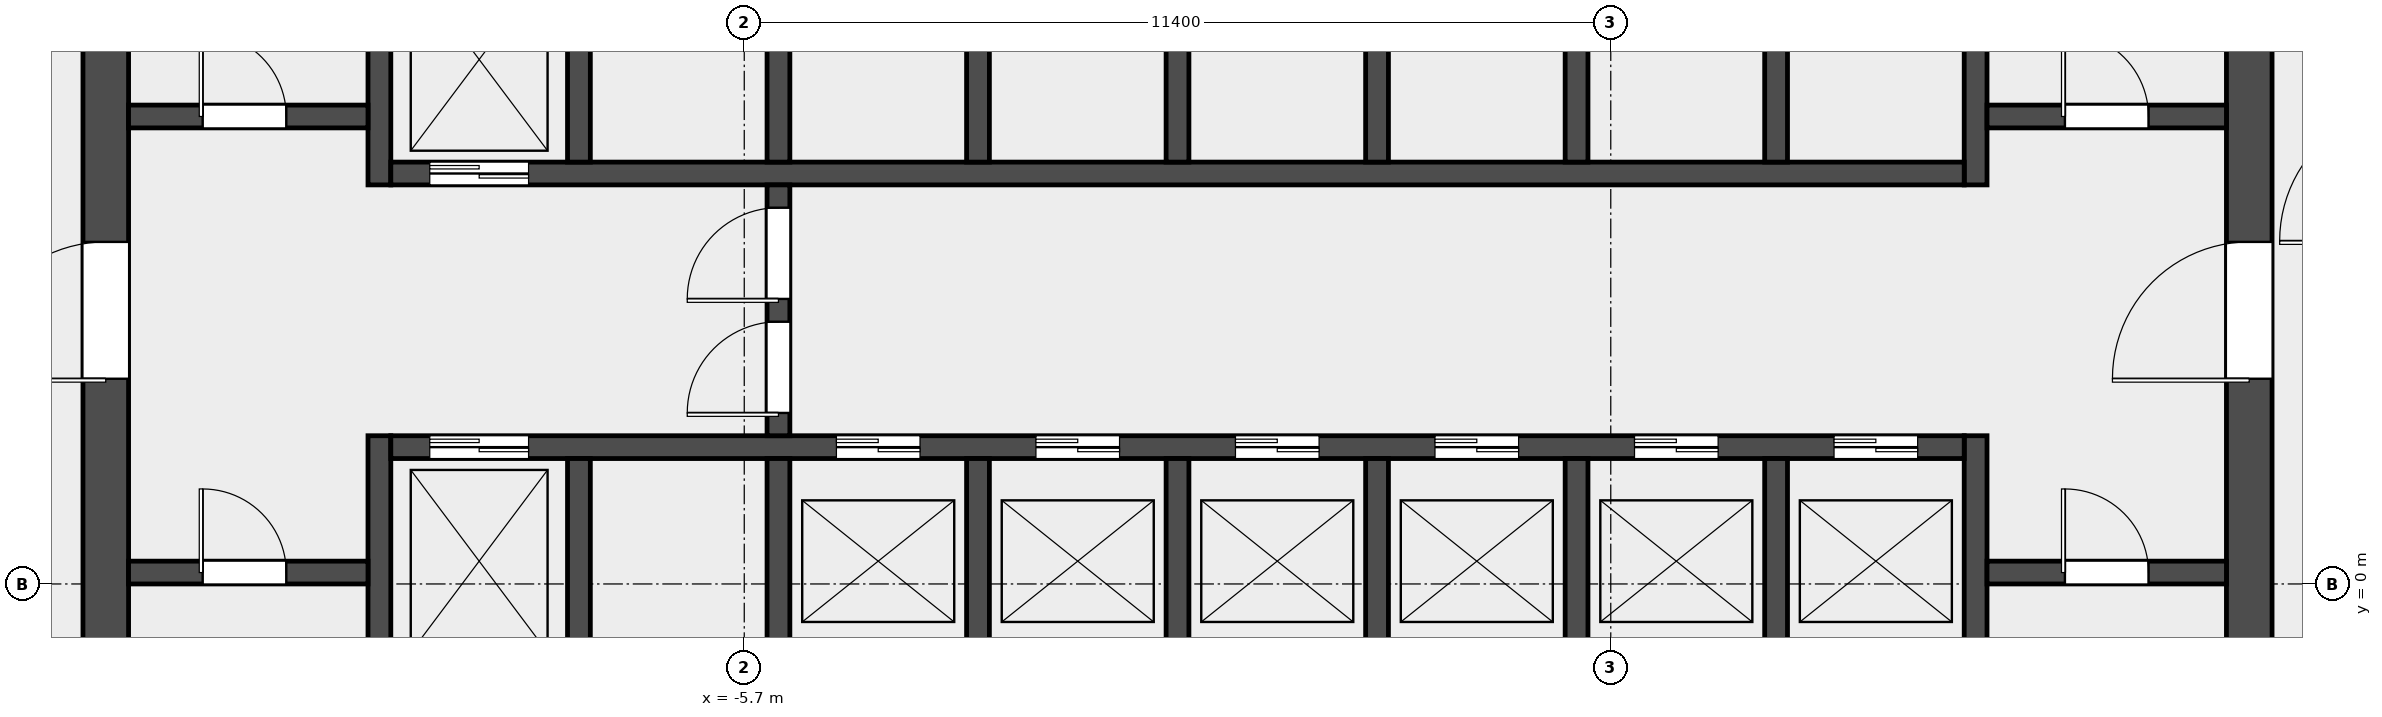
"""IFC4 building model, lengths in metres.
Left out: names, types, materials, properties, quantities, classifications, styles, units other than length and angle.
Written with IfcOpenShell. Run it as: python <this file> out.ifc"""

import sys

from ifc_helpers import new_model, si_unit, direction, frame, frame_2d, origin, place, context, subcontext, project, spatial, rectangle, extrude, element, fill, save


model = new_model("IFC4")
c1 = context("Model", 3, precision=1e-05, world=origin(), true_north=direction((0.0, 1.0)))
c2 = subcontext(c1, "Body", "Model", "MODEL_VIEW")
j1 = project(units=[si_unit("LENGTHUNIT", "METRE"), si_unit("PLANEANGLEUNIT", "RADIAN")], contexts=[c1])
p1 = place(None, origin())
s1 = spatial("IfcSite", under=j1, at=p1, CompositionType="ELEMENT")
p2 = place(p1, origin())
s2 = spatial("IfcBuilding", under=s1, at=p2, CompositionType="ELEMENT")
p3 = place(p2, frame((0.0, 0.0, 117.1)))
s3 = spatial("IfcBuildingStorey", under=s2, at=p3, CompositionType="ELEMENT", Elevation=117.1)
p4 = place(p3, frame((-14.1, -6.6, 0.0), z_axis=(0.0, 0.0, 1.0), x_axis=(0.0, 1.0, 0.0)))
e1 = element("IfcWall", 1, at=p4, inside=s3, PredefinedType="SHEAR", context=c2, shape_type="SweptSolid", body=[
    extrude(rectangle(XDim=19.5, YDim=0.6, at=frame_2d((9.75, 0.0))), origin(), (0.0, 0.0, 1.0), 4.2),
])
p5 = place(p4, frame((9.3, 0.0, 0.0)))
e2 = element("IfcOpeningElement", 2, at=p5, cuts=e1, PredefinedType="OPENING", context=c2, shape_type="SweptSolid", body=[
    extrude(rectangle(XDim=1.8, YDim=2.1, at=frame_2d((0.9, 1.05))), frame((0.0, 0.312, 0.0), z_axis=(0.0, -1.0, 0.0), x_axis=(1.0, 0.0, 0.0)), (0.0, 0.0, 1.0), 0.624),
])
p6 = place(p3, frame((14.1, -6.6, 0.0), z_axis=(0.0, 0.0, 1.0), x_axis=(0.0, 1.0, 0.0)))
e3 = element("IfcWall", 3, at=p6, inside=s3, PredefinedType="SHEAR", context=c2, shape_type="SweptSolid", body=[
    extrude(rectangle(XDim=19.5, YDim=0.6, at=frame_2d((9.75, 0.0))), origin(), (0.0, 0.0, 1.0), 4.2),
])
p7 = place(p6, frame((9.3, 0.0, 0.0)))
e4 = element("IfcOpeningElement", 4, at=p7, cuts=e3, PredefinedType="OPENING", context=c2, shape_type="SweptSolid", body=[
    extrude(rectangle(XDim=1.8, YDim=2.1, at=frame_2d((0.9, 1.05))), frame((0.0, 0.312, 0.0), z_axis=(0.0, -1.0, 0.0), x_axis=(1.0, 0.0, 0.0)), (0.0, 0.0, 1.0), 0.624),
])
p8 = place(p3, frame((-10.5, -6.6, 0.0), z_axis=(0.0, 0.0, 1.0), x_axis=(0.0, 1.0, 0.0)))
e5 = element("IfcWall", 5, at=p8, inside=s3, PredefinedType="SHEAR", context=c2, shape_type="SweptSolid", body=[
    extrude(rectangle(XDim=8.55, YDim=0.3, at=frame_2d((4.275, 0.0))), origin(), (0.0, 0.0, 1.0), 4.2),
])
p9 = place(p3, frame((-10.5, 5.25, 0.0), z_axis=(0.0, 0.0, 1.0), x_axis=(0.0, 1.0, 0.0)))
e6 = element("IfcWall", 6, at=p9, inside=s3, PredefinedType="SHEAR", context=c2, shape_type="SweptSolid", body=[
    extrude(rectangle(XDim=7.65, YDim=0.3, at=frame_2d((3.825, 0.0))), origin(), (0.0, 0.0, 1.0), 4.2),
])
p10 = place(p3, frame((10.5, -6.6, 0.0), z_axis=(0.0, 0.0, 1.0), x_axis=(0.0, 1.0, 0.0)))
e7 = element("IfcWall", 7, at=p10, inside=s3, PredefinedType="SHEAR", context=c2, shape_type="SweptSolid", body=[
    extrude(rectangle(XDim=8.55, YDim=0.3, at=frame_2d((4.275, 0.0))), origin(), (0.0, 0.0, 1.0), 4.2),
])
p11 = place(p3, frame((10.5, 5.25, 0.0), z_axis=(0.0, 0.0, 1.0), x_axis=(0.0, 1.0, 0.0)))
e8 = element("IfcWall", 8, at=p11, inside=s3, PredefinedType="SHEAR", context=c2, shape_type="SweptSolid", body=[
    extrude(rectangle(XDim=7.65, YDim=0.3, at=frame_2d((3.825, 0.0))), origin(), (0.0, 0.0, 1.0), 4.2),
])
p12 = place(p3, frame((-13.8, 0.15, 0.0), z_axis=(0.0, 0.0, 1.0), x_axis=(1.0, 0.0, 0.0)))
e9 = element("IfcWall", 9, at=p12, inside=s3, PredefinedType="SOLIDWALL", context=c2, shape_type="SweptSolid", body=[
    extrude(rectangle(XDim=3.15, YDim=0.3, at=frame_2d((1.575, 0.0))), origin(), (0.0, 0.0, 1.0), 4.2),
])
p13 = place(p12, frame((0.975, 0.0, 0.0)))
e10 = element("IfcOpeningElement", 10, at=p13, cuts=e9, PredefinedType="OPENING", context=c2, shape_type="SweptSolid", body=[
    extrude(rectangle(XDim=1.1, YDim=2.1, at=frame_2d((0.55, 1.05))), frame((0.0, 0.162, 0.0), z_axis=(0.0, -1.0, 0.0), x_axis=(1.0, 0.0, 0.0)), (0.0, 0.0, 1.0), 0.324),
])
p14 = place(p3, frame((-13.8, 6.15, 0.0), z_axis=(0.0, 0.0, 1.0), x_axis=(1.0, 0.0, 0.0)))
e11 = element("IfcWall", 11, at=p14, inside=s3, PredefinedType="SOLIDWALL", context=c2, shape_type="SweptSolid", body=[
    extrude(rectangle(XDim=3.15, YDim=0.3, at=frame_2d((1.575, 0.0))), origin(), (0.0, 0.0, 1.0), 4.2),
])
p15 = place(p14, frame((0.975, 0.0, 0.0)))
e12 = element("IfcOpeningElement", 12, at=p15, cuts=e11, PredefinedType="OPENING", context=c2, shape_type="SweptSolid", body=[
    extrude(rectangle(XDim=1.1, YDim=2.1, at=frame_2d((0.55, 1.05))), frame((0.0, 0.162, 0.0), z_axis=(0.0, -1.0, 0.0), x_axis=(1.0, 0.0, 0.0)), (0.0, 0.0, 1.0), 0.324),
])
p16 = place(p3, frame((10.65, 0.15, 0.0), z_axis=(0.0, 0.0, 1.0), x_axis=(1.0, 0.0, 0.0)))
e13 = element("IfcWall", 13, at=p16, inside=s3, PredefinedType="SOLIDWALL", context=c2, shape_type="SweptSolid", body=[
    extrude(rectangle(XDim=3.15, YDim=0.3, at=frame_2d((1.575, 0.0))), origin(), (0.0, 0.0, 1.0), 4.2),
])
p17 = place(p16, frame((1.025, 0.0, 0.0)))
e14 = element("IfcOpeningElement", 14, at=p17, cuts=e13, PredefinedType="OPENING", context=c2, shape_type="SweptSolid", body=[
    extrude(rectangle(XDim=1.1, YDim=2.1, at=frame_2d((0.55, 1.05))), frame((0.0, 0.162, 0.0), z_axis=(0.0, -1.0, 0.0), x_axis=(1.0, 0.0, 0.0)), (0.0, 0.0, 1.0), 0.324),
])
p18 = place(p3, frame((10.65, 6.15, 0.0), z_axis=(0.0, 0.0, 1.0), x_axis=(1.0, 0.0, 0.0)))
e15 = element("IfcWall", 15, at=p18, inside=s3, PredefinedType="SOLIDWALL", context=c2, shape_type="SweptSolid", body=[
    extrude(rectangle(XDim=3.15, YDim=0.3, at=frame_2d((1.575, 0.0))), origin(), (0.0, 0.0, 1.0), 4.2),
])
p19 = place(p18, frame((1.025, 0.0, 0.0)))
e16 = element("IfcOpeningElement", 16, at=p19, cuts=e15, PredefinedType="OPENING", context=c2, shape_type="SweptSolid", body=[
    extrude(rectangle(XDim=1.1, YDim=2.1, at=frame_2d((0.55, 1.05))), frame((0.0, 0.162, 0.0), z_axis=(0.0, -1.0, 0.0), x_axis=(1.0, 0.0, 0.0)), (0.0, 0.0, 1.0), 0.324),
])
p20 = place(p3, frame((-10.35, 1.8, 0.0), z_axis=(0.0, 0.0, 1.0), x_axis=(1.0, 0.0, 0.0)))
e17 = element("IfcWall", 17, at=p20, inside=s3, PredefinedType="SOLIDWALL", context=c2, shape_type="SweptSolid", body=[
    extrude(rectangle(XDim=20.7, YDim=0.3, at=frame_2d((10.35, 0.0))), origin(), (0.0, 0.0, 1.0), 4.2),
])
p21 = place(p20, frame((0.512, 0.0, 0.0)))
e18 = element("IfcOpeningElement", 18, at=p21, cuts=e17, PredefinedType="OPENING", context=c2, shape_type="SweptSolid", body=[
    extrude(rectangle(XDim=1.3, YDim=2.1, at=frame_2d((0.65, 1.05))), frame((0.0, 0.162, 0.0), z_axis=(0.0, -1.0, 0.0), x_axis=(1.0, 0.0, 0.0)), (0.0, 0.0, 1.0), 0.324),
])
p22 = place(p20, frame((5.863, 0.0, 0.0)))
e19 = element("IfcOpeningElement", 19, at=p22, cuts=e17, PredefinedType="OPENING", context=c2, shape_type="SweptSolid", body=[
    extrude(rectangle(XDim=1.1, YDim=2.1, at=frame_2d((0.55, 1.05))), frame((0.0, 0.162, 0.0), z_axis=(0.0, -1.0, 0.0), x_axis=(1.0, 0.0, 0.0)), (0.0, 0.0, 1.0), 0.324),
])
p23 = place(p20, frame((8.488, 0.0, 0.0)))
e20 = element("IfcOpeningElement", 20, at=p23, cuts=e17, PredefinedType="OPENING", context=c2, shape_type="SweptSolid", body=[
    extrude(rectangle(XDim=1.1, YDim=2.1, at=frame_2d((0.55, 1.05))), frame((0.0, 0.162, 0.0), z_axis=(0.0, -1.0, 0.0), x_axis=(1.0, 0.0, 0.0)), (0.0, 0.0, 1.0), 0.324),
])
p24 = place(p20, frame((11.113, 0.0, 0.0)))
e21 = element("IfcOpeningElement", 21, at=p24, cuts=e17, PredefinedType="OPENING", context=c2, shape_type="SweptSolid", body=[
    extrude(rectangle(XDim=1.1, YDim=2.1, at=frame_2d((0.55, 1.05))), frame((0.0, 0.162, 0.0), z_axis=(0.0, -1.0, 0.0), x_axis=(1.0, 0.0, 0.0)), (0.0, 0.0, 1.0), 0.324),
])
p25 = place(p20, frame((13.738, 0.0, 0.0)))
e22 = element("IfcOpeningElement", 22, at=p25, cuts=e17, PredefinedType="OPENING", context=c2, shape_type="SweptSolid", body=[
    extrude(rectangle(XDim=1.1, YDim=2.1, at=frame_2d((0.55, 1.05))), frame((0.0, 0.162, 0.0), z_axis=(0.0, -1.0, 0.0), x_axis=(1.0, 0.0, 0.0)), (0.0, 0.0, 1.0), 0.324),
])
p26 = place(p20, frame((16.363, 0.0, 0.0)))
e23 = element("IfcOpeningElement", 23, at=p26, cuts=e17, PredefinedType="OPENING", context=c2, shape_type="SweptSolid", body=[
    extrude(rectangle(XDim=1.1, YDim=2.1, at=frame_2d((0.55, 1.05))), frame((0.0, 0.162, 0.0), z_axis=(0.0, -1.0, 0.0), x_axis=(1.0, 0.0, 0.0)), (0.0, 0.0, 1.0), 0.324),
])
p27 = place(p20, frame((18.988, 0.0, 0.0)))
e24 = element("IfcOpeningElement", 24, at=p27, cuts=e17, PredefinedType="OPENING", context=c2, shape_type="SweptSolid", body=[
    extrude(rectangle(XDim=1.1, YDim=2.1, at=frame_2d((0.55, 1.05))), frame((0.0, 0.162, 0.0), z_axis=(0.0, -1.0, 0.0), x_axis=(1.0, 0.0, 0.0)), (0.0, 0.0, 1.0), 0.324),
])
p28 = place(p3, frame((-10.35, 5.4, 0.0), z_axis=(0.0, 0.0, 1.0), x_axis=(1.0, 0.0, 0.0)))
e25 = element("IfcWall", 25, at=p28, inside=s3, PredefinedType="SOLIDWALL", context=c2, shape_type="SweptSolid", body=[
    extrude(rectangle(XDim=20.7, YDim=0.3, at=frame_2d((10.35, 0.0))), origin(), (0.0, 0.0, 1.0), 4.2),
])
p29 = place(p28, frame((0.512, 0.0, 0.0)))
e26 = element("IfcOpeningElement", 26, at=p29, cuts=e25, PredefinedType="OPENING", context=c2, shape_type="SweptSolid", body=[
    extrude(rectangle(XDim=1.3, YDim=2.1, at=frame_2d((0.65, 1.05))), frame((0.0, 0.162, 0.0), z_axis=(0.0, -1.0, 0.0), x_axis=(1.0, 0.0, 0.0)), (0.0, 0.0, 1.0), 0.324),
])
for number, where, z_axis, x_axis in (
    (27, (-7.875, -1.05, 0.0), (0.0, 0.0, 1.0), (0.0, 1.0, 0.0)),
    (28, (-5.25, -1.05, 0.0), (0.0, 0.0, 1.0), (0.0, 1.0, 0.0)),
    (29, (-2.625, -1.05, 0.0), (0.0, 0.0, 1.0), (0.0, 1.0, 0.0)),
    (30, (0.0, -1.05, 0.0), (0.0, 0.0, 1.0), (0.0, 1.0, 0.0)),
    (31, (2.625, -1.05, 0.0), (0.0, 0.0, 1.0), (0.0, 1.0, 0.0)),
    (32, (5.25, -1.05, 0.0), (0.0, 0.0, 1.0), (0.0, 1.0, 0.0)),
    (33, (7.875, -1.05, 0.0), (0.0, 0.0, 1.0), (0.0, 1.0, 0.0)),
    (34, (-7.875, 5.55, 0.0), (0.0, 0.0, 1.0), (0.0, 1.0, 0.0)),
    (35, (-5.25, 5.55, 0.0), (0.0, 0.0, 1.0), (0.0, 1.0, 0.0)),
    (36, (-2.625, 5.55, 0.0), (0.0, 0.0, 1.0), (0.0, 1.0, 0.0)),
    (37, (0.0, 5.55, 0.0), (0.0, 0.0, 1.0), (0.0, 1.0, 0.0)),
    (38, (2.625, 5.55, 0.0), (0.0, 0.0, 1.0), (0.0, 1.0, 0.0)),
    (39, (5.25, 5.55, 0.0), (0.0, 0.0, 1.0), (0.0, 1.0, 0.0)),
    (40, (7.875, 5.55, 0.0), (0.0, 0.0, 1.0), (0.0, 1.0, 0.0)),
):
    element("IfcWall", number, at=place(p3, frame(where, z_axis=z_axis, x_axis=x_axis)), inside=s3, PredefinedType="SOLIDWALL", context=c2, shape_type="SweptSolid", body=[
        extrude(rectangle(XDim=2.7, YDim=0.3, at=frame_2d((1.35, 0.0))), origin(), (0.0, 0.0, 1.0), 4.2),
    ])
p30 = place(p3, frame((-5.25, 1.95, 0.0), z_axis=(0.0, 0.0, 1.0), x_axis=(0.0, 1.0, 0.0)))
e41 = element("IfcWall", 41, at=p30, inside=s3, PredefinedType="SOLIDWALL", context=c2, shape_type="SweptSolid", body=[
    extrude(rectangle(XDim=3.3, YDim=0.3, at=frame_2d((1.65, 0.0))), origin(), (0.0, 0.0, 1.0), 4.2),
])
p31 = place(p30, frame((0.3, 0.0, 0.0)))
e42 = element("IfcOpeningElement", 42, at=p31, cuts=e41, PredefinedType="OPENING", context=c2, shape_type="SweptSolid", body=[
    extrude(rectangle(XDim=1.2, YDim=2.1, at=frame_2d((0.6, 1.05))), frame((0.0, 0.162, 0.0), z_axis=(0.0, -1.0, 0.0), x_axis=(1.0, 0.0, 0.0)), (0.0, 0.0, 1.0), 0.324),
])
p32 = place(p30, frame((1.8, 0.0, 0.0)))
e43 = element("IfcOpeningElement", 43, at=p32, cuts=e41, PredefinedType="OPENING", context=c2, shape_type="SweptSolid", body=[
    extrude(rectangle(XDim=1.2, YDim=2.1, at=frame_2d((0.6, 1.05))), frame((0.0, 0.162, 0.0), z_axis=(0.0, -1.0, 0.0), x_axis=(1.0, 0.0, 0.0)), (0.0, 0.0, 1.0), 0.324),
])
p33 = place(p13, origin())
e44 = element("IfcDoor", 44, at=p33, inside=s3, OperationType="SINGLE_SWING_LEFT", PredefinedType="DOOR", context=c2, shape_type="SweptSolid", body=[
    extrude(rectangle(XDim=1.1, YDim=2.1, at=frame_2d((0.55, 1.05))), frame((0.0, 0.025, 0.0), z_axis=(0.0, -1.0, 0.0), x_axis=(1.0, 0.0, 0.0)), (0.0, 0.0, 1.0), 0.05),
])
fill(e10, e44)
p34 = place(p15, origin())
e45 = element("IfcDoor", 45, at=p34, inside=s3, OperationType="SINGLE_SWING_LEFT", PredefinedType="DOOR", context=c2, shape_type="SweptSolid", body=[
    extrude(rectangle(XDim=1.1, YDim=2.1, at=frame_2d((0.55, 1.05))), frame((0.0, 0.025, 0.0), z_axis=(0.0, -1.0, 0.0), x_axis=(1.0, 0.0, 0.0)), (0.0, 0.0, 1.0), 0.05),
])
fill(e12, e45)
p35 = place(p17, origin())
e46 = element("IfcDoor", 46, at=p35, inside=s3, OperationType="SINGLE_SWING_RIGHT", PredefinedType="DOOR", context=c2, shape_type="SweptSolid", body=[
    extrude(rectangle(XDim=1.1, YDim=2.1, at=frame_2d((0.55, 1.05))), frame((0.0, 0.025, 0.0), z_axis=(0.0, -1.0, 0.0), x_axis=(1.0, 0.0, 0.0)), (0.0, 0.0, 1.0), 0.05),
])
fill(e14, e46)
p36 = place(p19, origin())
e47 = element("IfcDoor", 47, at=p36, inside=s3, OperationType="SINGLE_SWING_RIGHT", PredefinedType="DOOR", context=c2, shape_type="SweptSolid", body=[
    extrude(rectangle(XDim=1.1, YDim=2.1, at=frame_2d((0.55, 1.05))), frame((0.0, 0.025, 0.0), z_axis=(0.0, -1.0, 0.0), x_axis=(1.0, 0.0, 0.0)), (0.0, 0.0, 1.0), 0.05),
])
fill(e16, e47)
p37 = place(p5, origin())
e48 = element("IfcDoor", 48, at=p37, inside=s3, OperationType="DOUBLE_DOOR_SINGLE_SWING", PredefinedType="DOOR", context=c2, shape_type="SweptSolid", body=[
    extrude(rectangle(XDim=1.8, YDim=2.1, at=frame_2d((0.9, 1.05))), frame((0.0, 0.025, 0.0), z_axis=(0.0, -1.0, 0.0), x_axis=(1.0, 0.0, 0.0)), (0.0, 0.0, 1.0), 0.05),
])
fill(e2, e48)
p38 = place(p7, origin())
e49 = element("IfcDoor", 49, at=p38, inside=s3, OperationType="DOUBLE_DOOR_SINGLE_SWING", PredefinedType="DOOR", context=c2, shape_type="SweptSolid", body=[
    extrude(rectangle(XDim=1.8, YDim=2.1, at=frame_2d((0.9, 1.05))), frame((0.0, 0.025, 0.0), z_axis=(0.0, -1.0, 0.0), x_axis=(1.0, 0.0, 0.0)), (0.0, 0.0, 1.0), 0.05),
])
fill(e4, e49)
p39 = place(p31, origin())
e50 = element("IfcDoor", 50, at=p39, inside=s3, OperationType="SINGLE_SWING_LEFT", PredefinedType="DOOR", context=c2, shape_type="SweptSolid", body=[
    extrude(rectangle(XDim=1.2, YDim=2.1, at=frame_2d((0.6, 1.05))), frame((0.0, 0.025, 0.0), z_axis=(0.0, -1.0, 0.0), x_axis=(1.0, 0.0, 0.0)), (0.0, 0.0, 1.0), 0.05),
])
fill(e42, e50)
p40 = place(p32, origin())
e51 = element("IfcDoor", 51, at=p40, inside=s3, OperationType="SINGLE_SWING_RIGHT", PredefinedType="DOOR", context=c2, shape_type="SweptSolid", body=[
    extrude(rectangle(XDim=1.2, YDim=2.1, at=frame_2d((0.6, 1.05))), frame((0.0, 0.025, 0.0), z_axis=(0.0, -1.0, 0.0), x_axis=(1.0, 0.0, 0.0)), (0.0, 0.0, 1.0), 0.05),
])
fill(e43, e51)
p41 = place(p21, origin())
e52 = element("IfcDoor", 52, at=p41, inside=s3, OperationType="DOUBLE_DOOR_SLIDING", PredefinedType="DOOR", context=c2, shape_type="SweptSolid", body=[
    extrude(rectangle(XDim=1.3, YDim=2.1, at=frame_2d((0.65, 1.05))), frame((0.0, 0.025, 0.0), z_axis=(0.0, -1.0, 0.0), x_axis=(1.0, 0.0, 0.0)), (0.0, 0.0, 1.0), 0.05),
])
fill(e18, e52)
p42 = place(p22, origin())
e53 = element("IfcDoor", 53, at=p42, inside=s3, OperationType="DOUBLE_DOOR_SLIDING", PredefinedType="DOOR", context=c2, shape_type="SweptSolid", body=[
    extrude(rectangle(XDim=1.1, YDim=2.1, at=frame_2d((0.55, 1.05))), frame((0.0, 0.025, 0.0), z_axis=(0.0, -1.0, 0.0), x_axis=(1.0, 0.0, 0.0)), (0.0, 0.0, 1.0), 0.05),
])
fill(e19, e53)
p43 = place(p23, origin())
e54 = element("IfcDoor", 54, at=p43, inside=s3, OperationType="DOUBLE_DOOR_SLIDING", PredefinedType="DOOR", context=c2, shape_type="SweptSolid", body=[
    extrude(rectangle(XDim=1.1, YDim=2.1, at=frame_2d((0.55, 1.05))), frame((0.0, 0.025, 0.0), z_axis=(0.0, -1.0, 0.0), x_axis=(1.0, 0.0, 0.0)), (0.0, 0.0, 1.0), 0.05),
])
fill(e20, e54)
p44 = place(p24, origin())
e55 = element("IfcDoor", 55, at=p44, inside=s3, OperationType="DOUBLE_DOOR_SLIDING", PredefinedType="DOOR", context=c2, shape_type="SweptSolid", body=[
    extrude(rectangle(XDim=1.1, YDim=2.1, at=frame_2d((0.55, 1.05))), frame((0.0, 0.025, 0.0), z_axis=(0.0, -1.0, 0.0), x_axis=(1.0, 0.0, 0.0)), (0.0, 0.0, 1.0), 0.05),
])
fill(e21, e55)
p45 = place(p25, origin())
e56 = element("IfcDoor", 56, at=p45, inside=s3, OperationType="DOUBLE_DOOR_SLIDING", PredefinedType="DOOR", context=c2, shape_type="SweptSolid", body=[
    extrude(rectangle(XDim=1.1, YDim=2.1, at=frame_2d((0.55, 1.05))), frame((0.0, 0.025, 0.0), z_axis=(0.0, -1.0, 0.0), x_axis=(1.0, 0.0, 0.0)), (0.0, 0.0, 1.0), 0.05),
])
fill(e22, e56)
p46 = place(p26, origin())
e57 = element("IfcDoor", 57, at=p46, inside=s3, OperationType="DOUBLE_DOOR_SLIDING", PredefinedType="DOOR", context=c2, shape_type="SweptSolid", body=[
    extrude(rectangle(XDim=1.1, YDim=2.1, at=frame_2d((0.55, 1.05))), frame((0.0, 0.025, 0.0), z_axis=(0.0, -1.0, 0.0), x_axis=(1.0, 0.0, 0.0)), (0.0, 0.0, 1.0), 0.05),
])
fill(e23, e57)
p47 = place(p27, origin())
e58 = element("IfcDoor", 58, at=p47, inside=s3, OperationType="DOUBLE_DOOR_SLIDING", PredefinedType="DOOR", context=c2, shape_type="SweptSolid", body=[
    extrude(rectangle(XDim=1.1, YDim=2.1, at=frame_2d((0.55, 1.05))), frame((0.0, 0.025, 0.0), z_axis=(0.0, -1.0, 0.0), x_axis=(1.0, 0.0, 0.0)), (0.0, 0.0, 1.0), 0.05),
])
fill(e24, e58)
p48 = place(p29, origin())
e59 = element("IfcDoor", 59, at=p48, inside=s3, OperationType="DOUBLE_DOOR_SLIDING", PredefinedType="DOOR", context=c2, shape_type="SweptSolid", body=[
    extrude(rectangle(XDim=1.3, YDim=2.1, at=frame_2d((0.65, 1.05))), frame((0.0, 0.025, 0.0), z_axis=(0.0, -1.0, 0.0), x_axis=(1.0, 0.0, 0.0)), (0.0, 0.0, 1.0), 0.05),
])
fill(e26, e59)
save(model, sys.argv[1])
